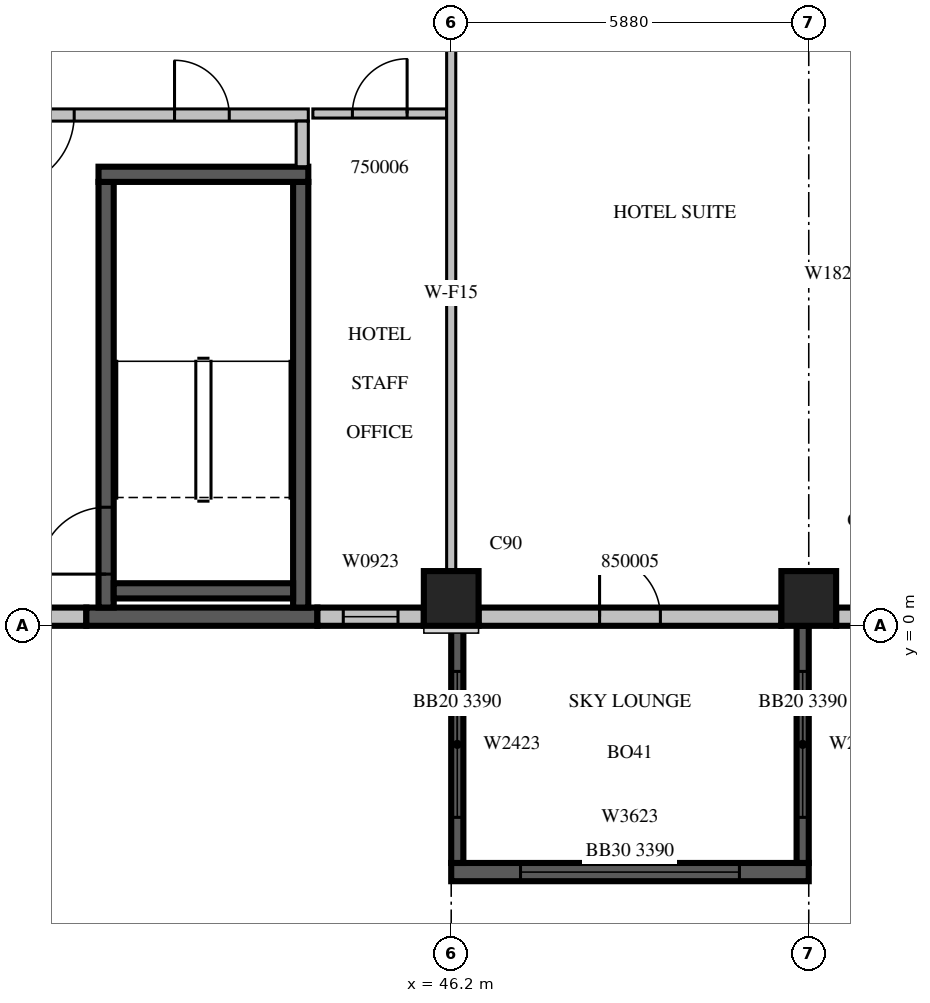
"""IFC4 building model, lengths in metres.
Left out: names, types, materials, properties, quantities, classifications, styles, units other than length and angle.
Written with IfcOpenShell. Run it as: python <this file> out.ifc"""

import sys

from ifc_helpers import new_model, si_unit, direction, frame, frame_2d, origin, origin_2d, place, context, subcontext, project, spatial, rectangle, extrude, source, transform, mapped, element, fill, save


model = new_model("IFC4")
c1 = context("Model", 3, precision=1e-05, world=origin(), true_north=direction((0.0, 1.0)))
c2 = subcontext(c1, "Body", "Model", "MODEL_VIEW")
j1 = project(units=[si_unit("LENGTHUNIT", "METRE"), si_unit("PLANEANGLEUNIT", "RADIAN")], contexts=[c1])
p1 = place(None, origin())
s1 = spatial("IfcSite", under=j1, at=p1, CompositionType="ELEMENT")
p2 = place(p1, origin())
s2 = spatial("IfcBuilding", under=s1, at=p2, CompositionType="ELEMENT")
p3 = place(p2, frame((0.0, 0.0, 223.4)))
s3 = spatial("IfcBuildingStorey", under=s2, at=p3, CompositionType="ELEMENT", Elevation=223.4)
m1 = source(origin(), c2, "Body", "SweptSolid", [
    extrude(rectangle(XDim=0.9, YDim=0.9, at=origin_2d()), origin(), (0.0, 0.0, 1.0), 3.8),
])
for number, where, z_axis, x_axis in (
    (1, (46.2, 0.45, 0.0), (0.0, 0.0, 1.0), (1.0, 0.0, 0.0)),
    (2, (52.08, 0.45, 0.0), (0.0, 0.0, 1.0), (1.0, 0.0, 0.0)),
):
    element("IfcColumn", number, at=place(p3, frame(where, z_axis=z_axis, x_axis=x_axis)), inside=s3, PredefinedType="COLUMN", context=c2, shape_type="MappedRepresentation", body=[
        mapped(m1, transform((0.0, 0.0, 0.0), scale=1.0)),
    ])
m2 = source(origin(), c2, "Body", "SweptSolid", [
    extrude(rectangle(XDim=1.95, YDim=0.3, at=frame_2d((0.975, 0.0))), origin(), (0.0, 0.0, 1.0), 3.4),
])
p4 = place(p3, frame((38.25, 0.15, 0.0), z_axis=(0.0, 0.0, 1.0), x_axis=(1.0, 0.0, 0.0)))
e3 = element("IfcWall", 3, at=p4, inside=s3, PredefinedType="STANDARD", context=c2, shape_type="MappedRepresentation", body=[
    mapped(m2, transform((0.0, 0.0, 0.0), scale=1.0)),
])
m3 = source(origin(), c2, "Body", "SweptSolid", [
    extrude(rectangle(XDim=3.8, YDim=0.3, at=frame_2d((1.9, 0.0))), origin(), (0.0, 0.0, 1.0), 3.4),
])
p5 = place(p3, frame((40.2, 0.15, 0.0), z_axis=(0.0, 0.0, 1.0), x_axis=(1.0, 0.0, 0.0)))
e4 = element("IfcWall", 4, at=p5, inside=s3, PredefinedType="SOLIDWALL", context=c2, shape_type="MappedRepresentation", body=[
    mapped(m3, transform((0.0, 0.0, 0.0), scale=1.0)),
])
m4 = source(origin(), c2, "Body", "SweptSolid", [
    extrude(rectangle(XDim=1.75, YDim=0.3, at=frame_2d((0.875, 0.0))), origin(), (0.0, 0.0, 1.0), 3.4),
])
p6 = place(p3, frame((44.0, 0.15, 0.0), z_axis=(0.0, 0.0, 1.0), x_axis=(1.0, 0.0, 0.0)))
e5 = element("IfcWall", 5, at=p6, inside=s3, PredefinedType="STANDARD", context=c2, shape_type="MappedRepresentation", body=[
    mapped(m4, transform((0.0, 0.0, 0.0), scale=1.0)),
])
m5 = source(origin(), c2, "Body", "SweptSolid", [
    extrude(rectangle(XDim=0.9, YDim=2.3, at=frame_2d((0.45, 1.15))), frame((0.0, 0.16, 0.0), z_axis=(0.0, -1.0, 0.0), x_axis=(1.0, 0.0, 0.0)), (0.0, 0.0, 1.0), 0.32),
])
p7 = place(p6, frame((0.425, 0.0, 0.6)))
e6 = element("IfcOpeningElement", 6, at=p7, cuts=e5, PredefinedType="OPENING", context=c2, shape_type="MappedRepresentation", body=[
    mapped(m5, transform((0.0, 0.0, 0.0), scale=1.0)),
])
m6 = source(origin(), c2, "Body", "SweptSolid", [
    extrude(rectangle(XDim=4.98, YDim=0.3, at=frame_2d((2.49, 0.0))), origin(), (0.0, 0.0, 1.0), 3.4),
])
p8 = place(p3, frame((46.65, 0.15, 0.0), z_axis=(0.0, 0.0, 1.0), x_axis=(1.0, 0.0, 0.0)))
e7 = element("IfcWall", 7, at=p8, inside=s3, PredefinedType="STANDARD", context=c2, shape_type="MappedRepresentation", body=[
    mapped(m6, transform((0.0, 0.0, 0.0), scale=1.0)),
])
m7 = source(origin(), c2, "Body", "SweptSolid", [
    extrude(rectangle(XDim=1.0, YDim=2.1, at=frame_2d((0.5, 1.05))), frame((0.0, 0.16, 0.0), z_axis=(0.0, -1.0, 0.0), x_axis=(1.0, 0.0, 0.0)), (0.0, 0.0, 1.0), 0.32),
])
p9 = place(p8, frame((1.99, 0.0, 0.0)))
e8 = element("IfcOpeningElement", 8, at=p9, cuts=e7, PredefinedType="OPENING", context=c2, shape_type="MappedRepresentation", body=[
    mapped(m7, transform((0.0, 0.0, 0.0), scale=1.0)),
])
m8 = source(origin(), c2, "Body", "SweptSolid", [
    extrude(rectangle(XDim=2.91, YDim=0.3, at=frame_2d((1.455, 0.0))), origin(), (0.0, 0.0, 1.0), 3.4),
])
p10 = place(p3, frame((52.53, 0.15, 0.0), z_axis=(0.0, 0.0, 1.0), x_axis=(1.0, 0.0, 0.0)))
e9 = element("IfcWall", 9, at=p10, inside=s3, PredefinedType="STANDARD", context=c2, shape_type="MappedRepresentation", body=[
    mapped(m8, transform((0.0, 0.0, 0.0), scale=1.0)),
])
m9 = source(origin(), c2, "Body", "SweptSolid", [
    extrude(rectangle(XDim=1.8, YDim=2.3, at=frame_2d((0.9, 1.15))), frame((0.0, 0.16, 0.0), z_axis=(0.0, -1.0, 0.0), x_axis=(1.0, 0.0, 0.0)), (0.0, 0.0, 1.0), 0.32),
])
p11 = place(p10, frame((0.33, 0.0, 0.6)))
e10 = element("IfcOpeningElement", 10, at=p11, cuts=e9, PredefinedType="OPENING", context=c2, shape_type="MappedRepresentation", body=[
    mapped(m9, transform((0.0, 0.0, 0.0), scale=1.0)),
])
m10 = source(origin(), c2, "Body", "SweptSolid", [
    extrude(rectangle(XDim=5.88, YDim=0.3, at=frame_2d((2.94, 0.0))), origin(), (0.0, 0.0, 1.0), 3.39),
])
p12 = place(p3, frame((46.2, -4.05, 0.0), z_axis=(0.0, 0.0, 1.0), x_axis=(1.0, 0.0, 0.0)))
e11 = element("IfcWall", 11, at=p12, inside=s3, PredefinedType="SOLIDWALL", context=c2, shape_type="MappedRepresentation", body=[
    mapped(m10, transform((0.0, 0.0, 0.0), scale=1.0)),
])
m11 = source(origin(), c2, "Body", "SweptSolid", [
    extrude(rectangle(XDim=3.6, YDim=2.3, at=frame_2d((1.8, 1.15))), frame((0.0, 0.16, 0.0), z_axis=(0.0, -1.0, 0.0), x_axis=(1.0, 0.0, 0.0)), (0.0, 0.0, 1.0), 0.32),
])
p13 = place(p12, frame((1.14, 0.0, 0.6)))
e12 = element("IfcOpeningElement", 12, at=p13, cuts=e11, PredefinedType="OPENING", context=c2, shape_type="MappedRepresentation", body=[
    mapped(m11, transform((0.0, 0.0, 0.0), scale=1.0)),
])
m12 = source(origin(), c2, "Body", "SweptSolid", [
    extrude(rectangle(XDim=3.9, YDim=0.2, at=frame_2d((1.95, 0.0))), origin(), (0.0, 0.0, 1.0), 3.39),
])
p14 = place(p3, frame((46.3, 0.0, 0.0), z_axis=(0.0, 0.0, 1.0), x_axis=(0.0, -1.0, 0.0)))
e13 = element("IfcWall", 13, at=p14, inside=s3, PredefinedType="SOLIDWALL", context=c2, shape_type="MappedRepresentation", body=[
    mapped(m12, transform((0.0, 0.0, 0.0), scale=1.0)),
])
m13 = source(origin(), c2, "Body", "SweptSolid", [
    extrude(rectangle(XDim=2.4, YDim=2.3, at=frame_2d((1.2, 1.15))), frame((0.0, 0.11, 0.0), z_axis=(0.0, -1.0, 0.0), x_axis=(1.0, 0.0, 0.0)), (0.0, 0.0, 1.0), 0.22),
])
p15 = place(p14, frame((0.75, 0.0, 0.6)))
e14 = element("IfcOpeningElement", 14, at=p15, cuts=e13, PredefinedType="OPENING", context=c2, shape_type="MappedRepresentation", body=[
    mapped(m13, transform((0.0, 0.0, 0.0), scale=1.0)),
])
p16 = place(p3, frame((51.98, 0.0, 0.0), z_axis=(0.0, 0.0, 1.0), x_axis=(0.0, -1.0, 0.0)))
e15 = element("IfcWall", 15, at=p16, inside=s3, PredefinedType="SOLIDWALL", context=c2, shape_type="MappedRepresentation", body=[
    mapped(m12, transform((0.0, 0.0, 0.0), scale=1.0)),
])
p17 = place(p16, frame((0.75, 0.0, 0.6)))
e16 = element("IfcOpeningElement", 16, at=p17, cuts=e15, PredefinedType="OPENING", context=c2, shape_type="MappedRepresentation", body=[
    mapped(m13, transform((0.0, 0.0, 0.0), scale=1.0)),
])
m14 = source(origin(), c2, "Body", "SweptSolid", [
    extrude(rectangle(XDim=7.0, YDim=0.25, at=frame_2d((3.5, 0.0))), origin(), (0.0, 0.0, 1.0), 3.4),
])
p18 = place(p3, frame((40.525, 0.3, 0.0), z_axis=(0.0, 0.0, 1.0), x_axis=(0.0, 1.0, 0.0)))
e17 = element("IfcWall", 17, at=p18, inside=s3, PredefinedType="SOLIDWALL", context=c2, shape_type="MappedRepresentation", body=[
    mapped(m14, transform((0.0, 0.0, 0.0), scale=1.0)),
])
m15 = source(origin(), c2, "Body", "SweptSolid", [
    extrude(rectangle(XDim=1.1, YDim=2.1, at=frame_2d((0.55, 1.05))), frame((0.0, 0.135, 0.0), z_axis=(0.0, -1.0, 0.0), x_axis=(1.0, 0.0, 0.0)), (0.0, 0.0, 1.0), 0.27),
])
p19 = place(p18, frame((0.55, 0.0, 0.0)))
e18 = element("IfcOpeningElement", 18, at=p19, cuts=e17, PredefinedType="OPENING", context=c2, shape_type="MappedRepresentation", body=[
    mapped(m15, transform((0.0, 0.0, 0.0), scale=1.0)),
])
p20 = place(p3, frame((43.725, 0.3, 0.0), z_axis=(0.0, 0.0, 1.0), x_axis=(0.0, 1.0, 0.0)))
e19 = element("IfcWall", 19, at=p20, inside=s3, PredefinedType="SOLIDWALL", context=c2, shape_type="MappedRepresentation", body=[
    mapped(m14, transform((0.0, 0.0, 0.0), scale=1.0)),
])
m16 = source(origin(), c2, "Body", "SweptSolid", [
    extrude(rectangle(XDim=3.45, YDim=0.25, at=frame_2d((1.725, 0.0))), origin(), (0.0, 0.0, 1.0), 3.4),
])
p21 = place(p3, frame((40.4, 7.425, 0.0), z_axis=(0.0, 0.0, 1.0), x_axis=(1.0, 0.0, 0.0)))
e20 = element("IfcWall", 20, at=p21, inside=s3, PredefinedType="SOLIDWALL", context=c2, shape_type="MappedRepresentation", body=[
    mapped(m16, transform((0.0, 0.0, 0.0), scale=1.0)),
])
m17 = source(origin(), c2, "Body", "SweptSolid", [
    extrude(rectangle(XDim=2.95, YDim=0.25, at=frame_2d((1.475, 0.0))), origin(), (0.0, 0.0, 1.0), 3.4),
])
p22 = place(p3, frame((40.65, 0.575, 0.0), z_axis=(0.0, 0.0, 1.0), x_axis=(1.0, 0.0, 0.0)))
e21 = element("IfcWall", 21, at=p22, inside=s3, PredefinedType="SOLIDWALL", context=c2, shape_type="MappedRepresentation", body=[
    mapped(m17, transform((0.0, 0.0, 0.0), scale=1.0)),
])
m18 = source(origin(), c2, "Body", "SweptSolid", [
    extrude(rectangle(XDim=5.45, YDim=0.2, at=frame_2d((2.725, 0.0))), origin(), (0.0, 0.0, 1.0), 3.4),
])
p23 = place(p3, frame((38.4, 8.4, 0.0), z_axis=(0.0, 0.0, 1.0), x_axis=(1.0, 0.0, 0.0)))
e22 = element("IfcWall", 22, at=p23, inside=s3, PredefinedType="PARTITIONING", context=c2, shape_type="MappedRepresentation", body=[
    mapped(m18, transform((0.0, 0.0, 0.0), scale=1.0)),
])
m19 = source(origin(), c2, "Body", "SweptSolid", [
    extrude(rectangle(XDim=1.2, YDim=2.1, at=frame_2d((0.6, 1.05))), frame((0.0, 0.11, 0.0), z_axis=(0.0, -1.0, 0.0), x_axis=(1.0, 0.0, 0.0)), (0.0, 0.0, 1.0), 0.22),
])
p24 = place(p23, frame((0.4, 0.0, 0.0)))
e23 = element("IfcOpeningElement", 23, at=p24, cuts=e22, PredefinedType="OPENING", context=c2, shape_type="MappedRepresentation", body=[
    mapped(m19, transform((0.0, 0.0, 0.0), scale=1.0)),
])
m20 = source(origin(), c2, "Body", "SweptSolid", [
    extrude(rectangle(XDim=0.9, YDim=2.1, at=frame_2d((0.45, 1.05))), frame((0.0, 0.11, 0.0), z_axis=(0.0, -1.0, 0.0), x_axis=(1.0, 0.0, 0.0)), (0.0, 0.0, 1.0), 0.22),
])
p25 = place(p23, frame((3.25, 0.0, 0.0)))
e24 = element("IfcOpeningElement", 24, at=p25, cuts=e22, PredefinedType="OPENING", context=c2, shape_type="MappedRepresentation", body=[
    mapped(m20, transform((0.0, 0.0, 0.0), scale=1.0)),
])
m21 = source(origin(), c2, "Body", "SweptSolid", [
    extrude(rectangle(XDim=0.75, YDim=0.2, at=frame_2d((0.375, 0.0))), origin(), (0.0, 0.0, 1.0), 3.4),
])
p26 = place(p3, frame((43.75, 7.55, 0.0), z_axis=(0.0, 0.0, 1.0), x_axis=(0.0, 1.0, 0.0)))
e25 = element("IfcWall", 25, at=p26, inside=s3, PredefinedType="PARTITIONING", context=c2, shape_type="MappedRepresentation", body=[
    mapped(m21, transform((0.0, 0.0, 0.0), scale=1.0)),
])
m22 = source(origin(), c2, "Body", "SweptSolid", [
    extrude(rectangle(XDim=2.2, YDim=0.15, at=frame_2d((1.1, 0.0))), origin(), (0.0, 0.0, 1.0), 3.4),
])
p27 = place(p3, frame((46.125, 8.425, 0.0), z_axis=(0.0, 0.0, 1.0), x_axis=(-1.0, 0.0, 0.0)))
e26 = element("IfcWall", 26, at=p27, inside=s3, PredefinedType="PARTITIONING", context=c2, shape_type="MappedRepresentation", body=[
    mapped(m22, transform((0.0, 0.0, 0.0), scale=1.0)),
])
m23 = source(origin(), c2, "Body", "SweptSolid", [
    extrude(rectangle(XDim=0.9, YDim=2.1, at=frame_2d((0.45, 1.05))), frame((0.0, 0.085, 0.0), z_axis=(0.0, -1.0, 0.0), x_axis=(1.0, 0.0, 0.0)), (0.0, 0.0, 1.0), 0.17),
])
p28 = place(p27, frame((0.65, 0.0, 0.0)))
e27 = element("IfcOpeningElement", 27, at=p28, cuts=e26, PredefinedType="OPENING", context=c2, shape_type="MappedRepresentation", body=[
    mapped(m23, transform((0.0, 0.0, 0.0), scale=1.0)),
])
m24 = source(origin(), c2, "Body", "SweptSolid", [
    extrude(rectangle(XDim=9.152, YDim=0.15, at=frame_2d((4.576, 0.0))), origin(), (0.0, 0.0, 1.0), 3.4),
])
p29 = place(p3, frame((46.2, 0.899, 0.0), z_axis=(0.0, 0.0, 1.0), x_axis=(0.0, 1.0, 0.0)))
e28 = element("IfcWall", 28, at=p29, inside=s3, PredefinedType="PARTITIONING", context=c2, shape_type="MappedRepresentation", body=[
    mapped(m24, transform((0.0, 0.0, 0.0), scale=1.0)),
])
m25 = source(origin(), c2, "Body", "SweptSolid", [
    extrude(rectangle(XDim=0.9, YDim=2.3, at=frame_2d((0.45, 1.15))), frame((0.0, 0.03, 0.0), z_axis=(0.0, -1.0, 0.0), x_axis=(1.0, 0.0, 0.0)), (0.0, 0.0, 1.0), 0.06),
])
p30 = place(p7, origin())
e29 = element("IfcWindow", 29, at=p30, inside=s3, PartitioningType="SINGLE_PANEL", PredefinedType="WINDOW", context=c2, shape_type="MappedRepresentation", body=[
    mapped(m25, transform((0.0, 0.0, 0.0), scale=1.0)),
])
fill(e6, e29)
m26 = source(origin(), c2, "Body", "SweptSolid", [
    extrude(rectangle(XDim=3.6, YDim=2.3, at=frame_2d((1.8, 1.15))), frame((0.0, 0.03, 0.0), z_axis=(0.0, -1.0, 0.0), x_axis=(1.0, 0.0, 0.0)), (0.0, 0.0, 1.0), 0.06),
])
p31 = place(p13, origin())
e30 = element("IfcWindow", 30, at=p31, inside=s3, PartitioningType="SINGLE_PANEL", PredefinedType="WINDOW", context=c2, shape_type="MappedRepresentation", body=[
    mapped(m26, transform((0.0, 0.0, 0.0), scale=1.0)),
])
fill(e12, e30)
m27 = source(origin(), c2, "Body", "SweptSolid", [
    extrude(rectangle(XDim=2.4, YDim=2.3, at=frame_2d((1.2, 1.15))), frame((0.0, 0.03, 0.0), z_axis=(0.0, -1.0, 0.0), x_axis=(1.0, 0.0, 0.0)), (0.0, 0.0, 1.0), 0.06),
])
p32 = place(p15, origin())
e31 = element("IfcWindow", 31, at=p32, inside=s3, PartitioningType="SINGLE_PANEL", PredefinedType="WINDOW", context=c2, shape_type="MappedRepresentation", body=[
    mapped(m27, transform((0.0, 0.0, 0.0), scale=1.0)),
])
fill(e14, e31)
p33 = place(p17, origin())
e32 = element("IfcWindow", 32, at=p33, inside=s3, PartitioningType="SINGLE_PANEL", PredefinedType="WINDOW", context=c2, shape_type="MappedRepresentation", body=[
    mapped(m27, transform((0.0, 0.0, 0.0), scale=1.0)),
])
fill(e16, e32)
m28 = source(origin(), c2, "Body", "SweptSolid", [
    extrude(rectangle(XDim=1.1, YDim=2.1, at=frame_2d((0.55, 1.05))), frame((0.0, 0.025, 0.0), z_axis=(0.0, -1.0, 0.0), x_axis=(1.0, 0.0, 0.0)), (0.0, 0.0, 1.0), 0.05),
])
p34 = place(p19, origin())
e33 = element("IfcDoor", 33, at=p34, inside=s3, OperationType="SINGLE_SWING_LEFT", PredefinedType="DOOR", context=c2, shape_type="MappedRepresentation", body=[
    mapped(m28, transform((0.0, 0.0, 0.0), scale=1.0)),
])
fill(e18, e33)
m29 = source(origin(), c2, "Body", "SweptSolid", [
    extrude(rectangle(XDim=1.2, YDim=2.1, at=frame_2d((0.6, 1.05))), frame((0.0, 0.025, 0.0), z_axis=(0.0, -1.0, 0.0), x_axis=(1.0, 0.0, 0.0)), (0.0, 0.0, 1.0), 0.05),
])
p35 = place(p24, origin())
e34 = element("IfcDoor", 34, at=p35, inside=s3, OperationType="SINGLE_SWING_RIGHT", PredefinedType="DOOR", context=c2, shape_type="MappedRepresentation", body=[
    mapped(m29, transform((0.0, 0.0, 0.0), scale=1.0)),
])
fill(e23, e34)
m30 = source(origin(), c2, "Body", "SweptSolid", [
    extrude(rectangle(XDim=0.9, YDim=2.1, at=frame_2d((0.45, 1.05))), frame((0.0, 0.025, 0.0), z_axis=(0.0, -1.0, 0.0), x_axis=(1.0, 0.0, 0.0)), (0.0, 0.0, 1.0), 0.05),
])
p36 = place(p25, origin())
e35 = element("IfcDoor", 35, at=p36, inside=s3, OperationType="SINGLE_SWING_LEFT", PredefinedType="DOOR", context=c2, shape_type="MappedRepresentation", body=[
    mapped(m30, transform((0.0, 0.0, 0.0), scale=1.0)),
])
fill(e24, e35)
p37 = place(p28, origin())
e36 = element("IfcDoor", 36, at=p37, inside=s3, OperationType="SINGLE_SWING_RIGHT", PredefinedType="DOOR", context=c2, shape_type="MappedRepresentation", body=[
    mapped(m30, transform((0.0, 0.0, 0.0), scale=1.0)),
])
fill(e27, e36)
m31 = source(origin(), c2, "Body", "SweptSolid", [
    extrude(rectangle(XDim=1.0, YDim=2.1, at=frame_2d((0.5, 1.05))), frame((0.0, 0.025, 0.0), z_axis=(0.0, -1.0, 0.0), x_axis=(1.0, 0.0, 0.0)), (0.0, 0.0, 1.0), 0.05),
])
p38 = place(p9, origin())
e37 = element("IfcDoor", 37, at=p38, inside=s3, OperationType="SINGLE_SWING_LEFT", PredefinedType="DOOR", context=c2, shape_type="MappedRepresentation", body=[
    mapped(m31, transform((0.0, 0.0, 0.0), scale=1.0)),
])
fill(e8, e37)
save(model, sys.argv[1])
